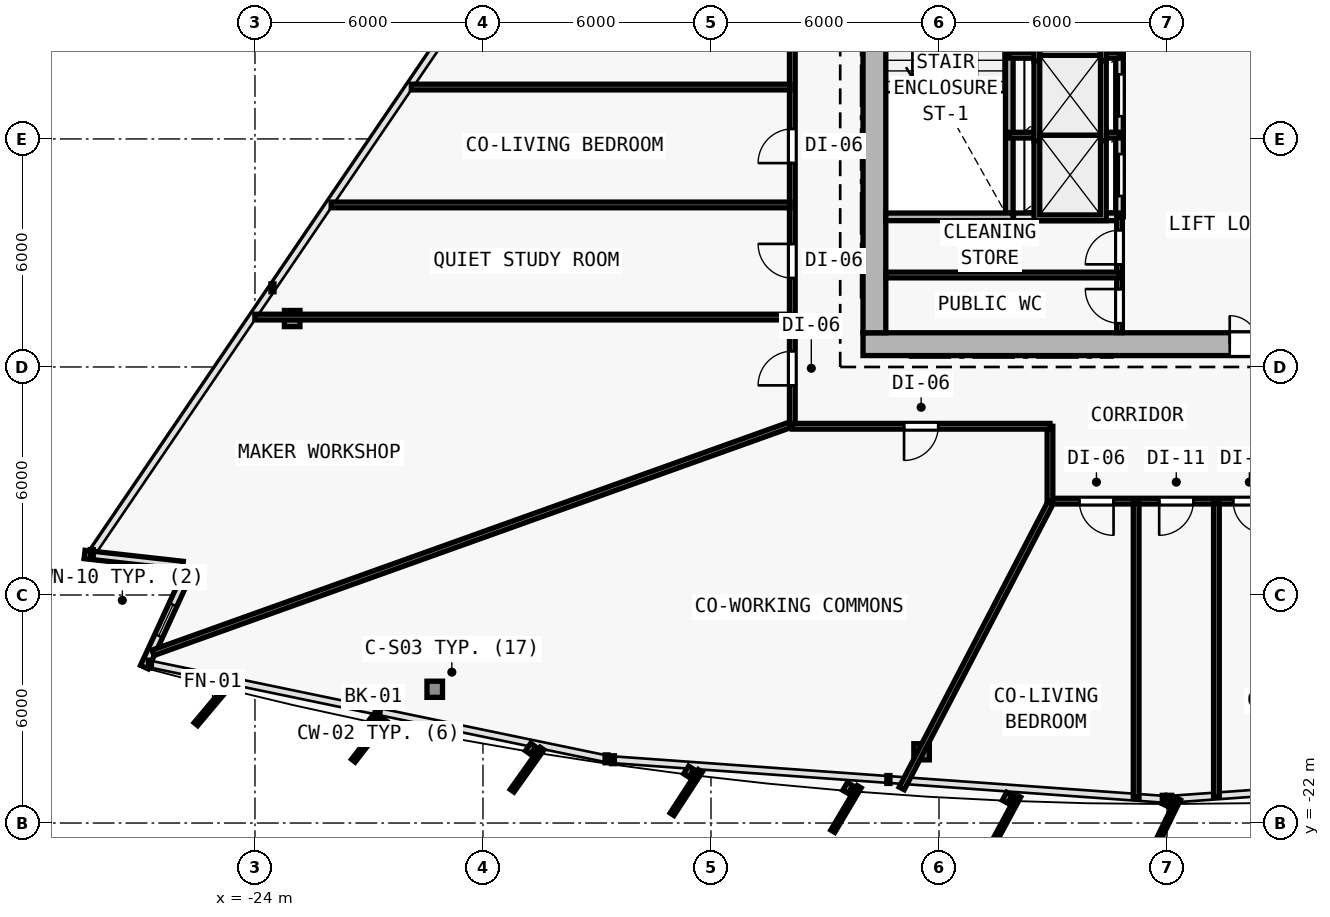
"""IFC4 building model, lengths in metres.
Left out: names, types, materials, properties, quantities, classifications, styles, units other than length and angle.
Written with IfcOpenShell. Run it as: python <this file> out.ifc"""

import sys

from ifc_helpers import new_model, si_unit, direction, frame, frame_2d, origin, origin_2d, place, context, subcontext, project, spatial, rectangle, i_section, extrude, element, fill, save


model = new_model("IFC4")
c1 = context("Model", 3, precision=1e-05, world=origin(), true_north=direction((0.0, 1.0)))
c2 = subcontext(c1, "Body", "Model", "MODEL_VIEW")
j1 = project(units=[si_unit("LENGTHUNIT", "METRE"), si_unit("PLANEANGLEUNIT", "RADIAN")], contexts=[c1])
p1 = place(None, origin())
s1 = spatial("IfcSite", under=j1, at=p1, CompositionType="ELEMENT")
p2 = place(p1, origin())
s2 = spatial("IfcBuilding", under=s1, at=p2, CompositionType="ELEMENT")
p3 = place(p2, frame((0.0, 0.0, 82.5)))
s3 = spatial("IfcBuildingStorey", under=s2, at=p3, CompositionType="ELEMENT", Elevation=82.5)
for number, where, z_axis, x_axis in (
    (1, (-7.7, -9.4, 0.0), (0.0, 0.0, 1.0), (1.0, 0.0, 0.0)),
    (2, (0.0, -9.4, 0.0), (0.0, 0.0, 1.0), (1.0, 0.0, 0.0)),
):
    element("IfcColumn", number, at=place(p3, frame(where, z_axis=z_axis, x_axis=x_axis)), inside=s3, PredefinedType="COLUMN", context=c2, shape_type="SweptSolid", body=[
        extrude(i_section(OverallWidth=0.409, OverallDepth=0.425, WebThickness=0.021, FlangeThickness=0.034, FilletRadius=0.015, at=origin_2d()), origin(), (0.0, 0.0, 1.0), 3.6),
    ])
p4 = place(p3, frame((-19.269, -18.48, 0.006), z_axis=(0.020596292833, 0.033511459955, 0.999226087917), x_axis=(-0.851954850327, 0.523615252838, 0.0)))
e3 = element("IfcColumn", 3, at=p4, inside=s3, PredefinedType="COLUMN", context=c2, shape_type="SweptSolid", body=[
    extrude(i_section(OverallWidth=0.409, OverallDepth=0.425, WebThickness=0.021, FlangeThickness=0.034, FilletRadius=0.015, at=origin_2d()), origin(), (0.0, 0.0, 1.0), 3.592),
])
p5 = place(p3, frame((-6.458, -20.125, 0.006), z_axis=(0.006934288159, 0.035283289748, 0.999353293441), x_axis=(-0.981229659911, 0.192842823335, 0.0)))
e4 = element("IfcColumn", 4, at=p5, inside=s3, PredefinedType="COLUMN", context=c2, shape_type="SweptSolid", body=[
    extrude(i_section(OverallWidth=0.409, OverallDepth=0.425, WebThickness=0.021, FlangeThickness=0.034, FilletRadius=0.015, at=origin_2d()), origin(), (0.0, 0.0, 1.0), 3.591),
])
p6 = place(p3, frame((-23.02, -8.726, 0.006), z_axis=(0.025224163578, 0.021620711639, 0.999447990843), x_axis=(-0.650791373456, 0.759256602365, 0.0)))
e5 = element("IfcColumn", 5, at=p6, inside=s3, PredefinedType="COLUMN", context=c2, shape_type="SweptSolid", body=[
    extrude(i_section(OverallWidth=0.409, OverallDepth=0.425, WebThickness=0.021, FlangeThickness=0.034, FilletRadius=0.015, at=origin_2d()), origin(), (0.0, 0.0, 1.0), 3.591),
])
p7 = place(p3, frame((-25.898, -15.223, 0.0), z_axis=(0.0, 0.0, 1.0), x_axis=(-0.993827522589, 0.110936267041, 0.0)))
e6 = element("IfcWall", 6, at=p7, inside=s3, PredefinedType="SOLIDWALL", context=c2, shape_type="SweptSolid", body=[
    extrude(rectangle(XDim=2.601, YDim=0.22, at=frame_2d((1.301, 0.0))), origin(), (0.0, 0.0, 1.0), 3.35),
])
p8 = place(p3, frame((-26.911, -17.897, 0.0), z_axis=(0.0, 0.0, 1.0), x_axis=(0.417504190978, 0.908674997189, 0.0)))
e7 = element("IfcWall", 7, at=p8, inside=s3, PredefinedType="SOLIDWALL", context=c2, shape_type="SweptSolid", body=[
    extrude(rectangle(XDim=2.711, YDim=0.22, at=frame_2d((1.355, 0.0))), origin(), (0.0, 0.0, 1.0), 3.35),
])
p9 = place(p8, frame((0.906, 0.0, 0.62)))
e8 = element("IfcOpeningElement", 8, at=p9, cuts=e7, PredefinedType="OPENING", context=c2, shape_type="SweptSolid", body=[
    extrude(rectangle(XDim=0.9, YDim=1.6, at=frame_2d((0.45, 0.8))), frame((0.0, 0.12, 0.0), z_axis=(0.0, -1.0, 0.0), x_axis=(1.0, 0.0, 0.0)), (0.0, 0.0, 1.0), 0.24),
])
p10 = place(p3, frame((-8.0, -9.4, 0.0), z_axis=(0.0, 0.0, 1.0), x_axis=(1.0, 0.0, 0.0)))
e9 = element("IfcWall", 9, at=p10, inside=s3, PredefinedType="SHEAR", context=c2, shape_type="SweptSolid", body=[
    extrude(rectangle(XDim=16.0, YDim=0.6, at=frame_2d((8.0, 0.0))), origin(), (0.0, 0.0, 1.0), 3.35),
])
p11 = place(p10, frame((9.65, 0.0, 0.0)))
e10 = element("IfcOpeningElement", 10, at=p11, cuts=e9, PredefinedType="OPENING", context=c2, shape_type="SweptSolid", body=[
    extrude(rectangle(XDim=1.5, YDim=2.2, at=frame_2d((0.75, 1.1))), frame((0.0, 0.31, 0.0), z_axis=(0.0, -1.0, 0.0), x_axis=(1.0, 0.0, 0.0)), (0.0, 0.0, 1.0), 0.62),
])
p12 = place(p3, frame((-7.7, -9.1, 0.0), z_axis=(0.0, 0.0, 1.0), x_axis=(0.0, 1.0, 0.0)))
e11 = element("IfcWall", 11, at=p12, inside=s3, PredefinedType="SHEAR", context=c2, shape_type="SweptSolid", body=[
    extrude(rectangle(XDim=19.0, YDim=0.6, at=frame_2d((9.5, 0.0))), origin(), (0.0, 0.0, 1.0), 3.35),
])
p13 = place(p12, frame((12.65, 0.0, 0.0)))
e12 = element("IfcOpeningElement", 12, at=p13, cuts=e11, PredefinedType="OPENING", context=c2, shape_type="SweptSolid", body=[
    extrude(rectangle(XDim=1.1, YDim=2.15, at=frame_2d((0.55, 1.075))), frame((0.0, 0.31, 0.0), z_axis=(0.0, -1.0, 0.0), x_axis=(1.0, 0.0, 0.0)), (0.0, 0.0, 1.0), 0.62),
])
p14 = place(p3, frame((-4.15, -5.95, 0.0), z_axis=(0.0, 0.0, 1.0), x_axis=(0.0, 1.0, 0.0)))
e13 = element("IfcWall", 13, at=p14, inside=s3, PredefinedType="SOLIDWALL", context=c2, shape_type="SweptSolid", body=[
    extrude(rectangle(XDim=7.2, YDim=0.2, at=frame_2d((3.6, 0.0))), origin(), (0.0, 0.0, 1.0), 3.35),
])
p15 = place(p3, frame((-1.25, -6.05, 0.0), z_axis=(0.0, 0.0, 1.0), x_axis=(0.0, 1.0, 0.0)))
e14 = element("IfcWall", 14, at=p15, inside=s3, PredefinedType="SOLIDWALL", context=c2, shape_type="SweptSolid", body=[
    extrude(rectangle(XDim=8.7, YDim=0.2, at=frame_2d((4.35, 0.0))), origin(), (0.0, 0.0, 1.0), 3.35),
])
p16 = place(p15, frame((0.55, 0.0, 0.0)))
e15 = element("IfcOpeningElement", 15, at=p16, cuts=e14, PredefinedType="OPENING", context=c2, shape_type="SweptSolid", body=[
    extrude(rectangle(XDim=1.1, YDim=2.15, at=frame_2d((0.55, 1.075))), frame((0.0, 0.11, 0.0), z_axis=(0.0, -1.0, 0.0), x_axis=(1.0, 0.0, 0.0)), (0.0, 0.0, 1.0), 0.22),
])
p17 = place(p15, frame((2.65, 0.0, 0.0)))
e16 = element("IfcOpeningElement", 16, at=p17, cuts=e14, PredefinedType="OPENING", context=c2, shape_type="SweptSolid", body=[
    extrude(rectangle(XDim=1.1, YDim=2.15, at=frame_2d((0.55, 1.075))), frame((0.0, 0.11, 0.0), z_axis=(0.0, -1.0, 0.0), x_axis=(1.0, 0.0, 0.0)), (0.0, 0.0, 1.0), 0.22),
])
p18 = place(p15, frame((4.75, 0.0, 0.0)))
e17 = element("IfcOpeningElement", 17, at=p18, cuts=e14, PredefinedType="OPENING", context=c2, shape_type="SweptSolid", body=[
    extrude(rectangle(XDim=1.1, YDim=2.15, at=frame_2d((0.55, 1.075))), frame((0.0, 0.11, 0.0), z_axis=(0.0, -1.0, 0.0), x_axis=(1.0, 0.0, 0.0)), (0.0, 0.0, 1.0), 0.22),
])
p19 = place(p15, frame((6.85, 0.0, 0.0)))
e18 = element("IfcOpeningElement", 18, at=p19, cuts=e14, PredefinedType="OPENING", context=c2, shape_type="SweptSolid", body=[
    extrude(rectangle(XDim=1.1, YDim=2.15, at=frame_2d((0.55, 1.075))), frame((0.0, 0.11, 0.0), z_axis=(0.0, -1.0, 0.0), x_axis=(1.0, 0.0, 0.0)), (0.0, 0.0, 1.0), 0.22),
])
for number, where, z_axis, x_axis in (
    (19, (-4.15, -3.9, 0.0), (0.0, 0.0, 1.0), (1.0, 0.0, 0.0)),
    (20, (-4.15, -1.8, 0.0), (0.0, 0.0, 1.0), (1.0, 0.0, 0.0)),
):
    element("IfcWall", number, at=place(p3, frame(where, z_axis=z_axis, x_axis=x_axis)), inside=s3, PredefinedType="PARTITIONING", context=c2, shape_type="SweptSolid", body=[
        extrude(rectangle(XDim=2.9, YDim=0.15, at=frame_2d((1.45, 0.0))), origin(), (0.0, 0.0, 1.0), 3.35),
    ])
p20 = place(p3, frame((-7.4, -6.05, 0.0), z_axis=(0.0, 0.0, 1.0), x_axis=(1.0, 0.0, 0.0)))
e21 = element("IfcWall", 21, at=p20, inside=s3, PredefinedType="SOLIDWALL", context=c2, shape_type="SweptSolid", body=[
    extrude(rectangle(XDim=3.35, YDim=0.2, at=frame_2d((1.675, 0.0))), origin(), (0.0, 0.0, 1.0), 3.35),
])
p21 = place(p3, frame((-4.04, -6.05, 0.0), z_axis=(0.0, 0.0, 1.0), x_axis=(1.0, 0.0, 0.0)))
e22 = element("IfcWall", 22, at=p21, inside=s3, PredefinedType="SOLIDWALL", context=c2, shape_type="SweptSolid", body=[
    extrude(rectangle(XDim=2.79, YDim=0.2, at=frame_2d((1.395, 0.0))), origin(), (0.0, 0.0, 1.0), 3.35),
])
p22 = place(p3, frame((-1.25, -9.095, 0.0), z_axis=(0.0, 0.0, 1.0), x_axis=(0.0, 1.0, 0.0)))
e23 = element("IfcWall", 23, at=p22, inside=s3, PredefinedType="PARTITIONING", context=c2, shape_type="SweptSolid", body=[
    extrude(rectangle(XDim=3.045, YDim=0.15, at=frame_2d((1.522, 0.0))), origin(), (0.0, 0.0, 1.0), 3.35),
])
p23 = place(p22, frame((1.795, 0.0, 0.0)))
e24 = element("IfcOpeningElement", 24, at=p23, cuts=e23, PredefinedType="OPENING", context=c2, shape_type="SweptSolid", body=[
    extrude(rectangle(XDim=0.9, YDim=2.1, at=frame_2d((0.45, 1.05))), frame((0.0, 0.085, 0.0), z_axis=(0.0, -1.0, 0.0), x_axis=(1.0, 0.0, 0.0)), (0.0, 0.0, 1.0), 0.17),
])
p24 = place(p22, frame((0.245, 0.0, 0.0)))
e25 = element("IfcOpeningElement", 25, at=p24, cuts=e23, PredefinedType="OPENING", context=c2, shape_type="SweptSolid", body=[
    extrude(rectangle(XDim=0.9, YDim=2.1, at=frame_2d((0.45, 1.05))), frame((0.0, 0.085, 0.0), z_axis=(0.0, -1.0, 0.0), x_axis=(1.0, 0.0, 0.0)), (0.0, 0.0, 1.0), 0.17),
])
p25 = place(p3, frame((-7.395, -7.58, 0.0), z_axis=(0.0, 0.0, 1.0), x_axis=(1.0, 0.0, 0.0)))
e26 = element("IfcWall", 26, at=p25, inside=s3, PredefinedType="PARTITIONING", context=c2, shape_type="SweptSolid", body=[
    extrude(rectangle(XDim=6.145, YDim=0.15, at=frame_2d((3.073, 0.0))), origin(), (0.0, 0.0, 1.0), 3.35),
])
p26 = place(p3, frame((-9.86, -11.56, 0.0), z_axis=(0.0, 0.0, 1.0), x_axis=(0.0, 1.0, 0.0)))
e27 = element("IfcWall", 27, at=p26, inside=s3, PredefinedType="PARTITIONING", context=c2, shape_type="SweptSolid", body=[
    extrude(rectangle(XDim=19.986, YDim=0.15, at=frame_2d((9.993, 0.0))), origin(), (0.0, 0.0, 1.0), 2.609),
])
p27 = place(p26, frame((9.988, 0.0, 0.0)))
e28 = element("IfcOpeningElement", 28, at=p27, cuts=e27, PredefinedType="OPENING", context=c2, shape_type="SweptSolid", body=[
    extrude(rectangle(XDim=0.9, YDim=2.1, at=frame_2d((0.45, 1.05))), frame((0.0, 0.085, 0.0), z_axis=(0.0, -1.0, 0.0), x_axis=(1.0, 0.0, 0.0)), (0.0, 0.0, 1.0), 0.17),
])
p28 = place(p26, frame((6.925, 0.0, 0.0)))
e29 = element("IfcOpeningElement", 29, at=p28, cuts=e27, PredefinedType="OPENING", context=c2, shape_type="SweptSolid", body=[
    extrude(rectangle(XDim=0.9, YDim=2.1, at=frame_2d((0.45, 1.05))), frame((0.0, 0.085, 0.0), z_axis=(0.0, -1.0, 0.0), x_axis=(1.0, 0.0, 0.0)), (0.0, 0.0, 1.0), 0.17),
])
p29 = place(p26, frame((3.898, 0.0, 0.0)))
e30 = element("IfcOpeningElement", 30, at=p29, cuts=e27, PredefinedType="OPENING", context=c2, shape_type="SweptSolid", body=[
    extrude(rectangle(XDim=0.9, YDim=2.1, at=frame_2d((0.45, 1.05))), frame((0.0, 0.085, 0.0), z_axis=(0.0, -1.0, 0.0), x_axis=(1.0, 0.0, 0.0)), (0.0, 0.0, 1.0), 0.17),
])
p30 = place(p26, frame((1.076, 0.0, 0.0)))
e31 = element("IfcOpeningElement", 31, at=p30, cuts=e27, PredefinedType="OPENING", context=c2, shape_type="SweptSolid", body=[
    extrude(rectangle(XDim=0.9, YDim=2.1, at=frame_2d((0.45, 1.05))), frame((0.0, 0.085, 0.0), z_axis=(0.0, -1.0, 0.0), x_axis=(1.0, 0.0, 0.0)), (0.0, 0.0, 1.0), 0.17),
])
p31 = place(p26, frame((12.649, 0.0, 0.0)))
e32 = element("IfcOpeningElement", 32, at=p31, cuts=e27, PredefinedType="OPENING", context=c2, shape_type="SweptSolid", body=[
    extrude(rectangle(XDim=0.9, YDim=2.1, at=frame_2d((0.45, 1.05))), frame((0.0, 0.085, 0.0), z_axis=(0.0, -1.0, 0.0), x_axis=(1.0, 0.0, 0.0)), (0.0, 0.0, 1.0), 0.17),
])
p32 = place(p3, frame((3.08, -13.53, 0.0), z_axis=(0.0, 0.0, 1.0), x_axis=(-1.0, 0.0, 0.0)))
e33 = element("IfcWall", 33, at=p32, inside=s3, PredefinedType="PARTITIONING", context=c2, shape_type="SweptSolid", body=[
    extrude(rectangle(XDim=6.16, YDim=0.15, at=frame_2d((3.08, 0.0))), origin(), (0.0, 0.0, 1.0), 2.725),
])
p33 = place(p32, frame((4.487, 0.0, 0.0)))
e34 = element("IfcOpeningElement", 34, at=p33, cuts=e33, PredefinedType="OPENING", context=c2, shape_type="SweptSolid", body=[
    extrude(rectangle(XDim=0.9, YDim=2.1, at=frame_2d((0.45, 1.05))), frame((0.0, 0.085, 0.0), z_axis=(0.0, -1.0, 0.0), x_axis=(1.0, 0.0, 0.0)), (0.0, 0.0, 1.0), 0.17),
])
p34 = place(p32, frame((2.386, 0.0, 0.0)))
e35 = element("IfcOpeningElement", 35, at=p34, cuts=e33, PredefinedType="OPENING", context=c2, shape_type="SweptSolid", body=[
    extrude(rectangle(XDim=0.9, YDim=2.1, at=frame_2d((0.45, 1.05))), frame((0.0, 0.085, 0.0), z_axis=(0.0, -1.0, 0.0), x_axis=(1.0, 0.0, 0.0)), (0.0, 0.0, 1.0), 0.17),
])
p35 = place(p32, frame((0.489, 0.0, 0.0)))
e36 = element("IfcOpeningElement", 36, at=p35, cuts=e33, PredefinedType="OPENING", context=c2, shape_type="SweptSolid", body=[
    extrude(rectangle(XDim=0.85, YDim=2.1, at=frame_2d((0.425, 1.05))), frame((0.0, 0.085, 0.0), z_axis=(0.0, -1.0, 0.0), x_axis=(1.0, 0.0, 0.0)), (0.0, 0.0, 1.0), 0.17),
])
p36 = place(p3, frame((-3.08, -13.53, 0.0), z_axis=(0.0, 0.0, 1.0), x_axis=(0.0, 1.0, 0.0)))
e37 = element("IfcWall", 37, at=p36, inside=s3, PredefinedType="PARTITIONING", context=c2, shape_type="SweptSolid", body=[
    extrude(rectangle(XDim=1.97, YDim=0.15, at=frame_2d((0.985, 0.0))), origin(), (0.0, 0.0, 1.0), 2.965),
])
p37 = place(p3, frame((-3.08, -11.56, 0.0), z_axis=(0.0, 0.0, 1.0), x_axis=(-1.0, 0.0, 0.0)))
e38 = element("IfcWall", 38, at=p37, inside=s3, PredefinedType="PARTITIONING", context=c2, shape_type="SweptSolid", body=[
    extrude(rectangle(XDim=6.78, YDim=0.15, at=frame_2d((3.39, 0.0))), origin(), (0.0, 0.0, 1.0), 3.35),
])
p38 = place(p37, frame((2.94, 0.0, 0.0)))
e39 = element("IfcOpeningElement", 39, at=p38, cuts=e38, PredefinedType="OPENING", context=c2, shape_type="SweptSolid", body=[
    extrude(rectangle(XDim=0.9, YDim=2.1, at=frame_2d((0.45, 1.05))), frame((0.0, 0.085, 0.0), z_axis=(0.0, -1.0, 0.0), x_axis=(1.0, 0.0, 0.0)), (0.0, 0.0, 1.0), 0.17),
])
p39 = place(p3, frame((-3.066, -13.573, 0.0), z_axis=(0.0, 0.0, 1.0), x_axis=(-0.461995798776, -0.886882112749, 0.0)))
e40 = element("IfcWall", 40, at=p39, inside=s3, PredefinedType="PARTITIONING", context=c2, shape_type="SweptSolid", body=[
    extrude(rectangle(XDim=8.474, YDim=0.15, at=frame_2d((4.237, 0.0))), origin(), (0.0, 0.0, 1.0), 2.725),
])
p40 = place(p3, frame((-9.92, -8.687, 0.0), z_axis=(0.0, 0.0, 1.0), x_axis=(-1.0, 0.0, 0.0)))
e41 = element("IfcWall", 41, at=p40, inside=s3, PredefinedType="PARTITIONING", context=c2, shape_type="SweptSolid", body=[
    extrude(rectangle(XDim=14.083, YDim=0.15, at=frame_2d((7.041, 0.0))), origin(), (0.0, 0.0, 1.0), 2.609),
])
p41 = place(p3, frame((-9.92, -2.635, 0.0), z_axis=(0.0, 0.0, 1.0), x_axis=(-1.0, 0.0, 0.0)))
e42 = element("IfcWall", 42, at=p41, inside=s3, PredefinedType="PARTITIONING", context=c2, shape_type="SweptSolid", body=[
    extrude(rectangle(XDim=9.965, YDim=0.15, at=frame_2d((4.983, 0.0))), origin(), (0.0, 0.0, 1.0), 2.835),
])
p42 = place(p3, frame((-0.812, -13.59, 0.0), z_axis=(0.0, 0.0, 1.0), x_axis=(0.0, -1.0, 0.0)))
e43 = element("IfcWall", 43, at=p42, inside=s3, PredefinedType="PARTITIONING", context=c2, shape_type="SweptSolid", body=[
    extrude(rectangle(XDim=7.732, YDim=0.15, at=frame_2d((3.866, 0.0))), origin(), (0.0, 0.0, 1.0), 2.835),
])
p43 = place(p3, frame((-9.92, -5.736, 0.0), z_axis=(0.0, 0.0, 1.0), x_axis=(-1.0, 0.0, 0.0)))
e44 = element("IfcWall", 44, at=p43, inside=s3, PredefinedType="PARTITIONING", context=c2, shape_type="SweptSolid", body=[
    extrude(rectangle(XDim=12.075, YDim=0.15, at=frame_2d((6.038, 0.0))), origin(), (0.0, 0.0, 1.0), 2.835),
])
p44 = place(p3, frame((-9.914, -11.521, 0.0), z_axis=(0.0, 0.0, 1.0), x_axis=(-0.941545444301, -0.33688599899, 0.0)))
e45 = element("IfcWall", 45, at=p44, inside=s3, PredefinedType="PARTITIONING", context=c2, shape_type="SweptSolid", body=[
    extrude(rectangle(XDim=17.811, YDim=0.15, at=frame_2d((8.905, 0.0))), origin(), (0.0, 0.0, 1.0), 2.725),
])
p45 = place(p3, frame((1.3, -13.59, 0.0), z_axis=(0.0, 0.0, 1.0), x_axis=(0.0, -1.0, 0.0)))
e46 = element("IfcWall", 46, at=p45, inside=s3, PredefinedType="PARTITIONING", context=c2, shape_type="SweptSolid", body=[
    extrude(rectangle(XDim=7.727, YDim=0.15, at=frame_2d((3.864, 0.0))), origin(), (0.0, 0.0, 1.0), 2.835),
])
p46 = place(p9, origin())
e47 = element("IfcWindow", 47, at=p46, inside=s3, PartitioningType="SINGLE_PANEL", PredefinedType="WINDOW", context=c2, shape_type="SweptSolid", body=[
    extrude(rectangle(XDim=0.9, YDim=1.6, at=frame_2d((0.45, 0.8))), frame((0.0, 0.03, 0.0), z_axis=(0.0, -1.0, 0.0), x_axis=(1.0, 0.0, 0.0)), (0.0, 0.0, 1.0), 0.06),
])
fill(e8, e47)
p47 = place(p11, origin())
e48 = element("IfcDoor", 48, at=p47, inside=s3, OperationType="DOUBLE_DOOR_SINGLE_SWING", PredefinedType="DOOR", context=c2, shape_type="SweptSolid", body=[
    extrude(rectangle(XDim=1.5, YDim=2.2, at=frame_2d((0.75, 1.1))), frame((0.0, 0.025, 0.0), z_axis=(0.0, -1.0, 0.0), x_axis=(1.0, 0.0, 0.0)), (0.0, 0.0, 1.0), 0.05),
])
fill(e10, e48)
p48 = place(p16, origin())
e49 = element("IfcDoor", 49, at=p48, inside=s3, OperationType="DOUBLE_DOOR_SLIDING", PredefinedType="DOOR", context=c2, shape_type="SweptSolid", body=[
    extrude(rectangle(XDim=1.1, YDim=2.15, at=frame_2d((0.55, 1.075))), frame((0.0, 0.025, 0.0), z_axis=(0.0, -1.0, 0.0), x_axis=(1.0, 0.0, 0.0)), (0.0, 0.0, 1.0), 0.05),
])
fill(e15, e49)
p49 = place(p17, origin())
e50 = element("IfcDoor", 50, at=p49, inside=s3, OperationType="DOUBLE_DOOR_SLIDING", PredefinedType="DOOR", context=c2, shape_type="SweptSolid", body=[
    extrude(rectangle(XDim=1.1, YDim=2.15, at=frame_2d((0.55, 1.075))), frame((0.0, 0.025, 0.0), z_axis=(0.0, -1.0, 0.0), x_axis=(1.0, 0.0, 0.0)), (0.0, 0.0, 1.0), 0.05),
])
fill(e16, e50)
p50 = place(p23, origin())
e51 = element("IfcDoor", 51, at=p50, inside=s3, OperationType="SINGLE_SWING_LEFT", PredefinedType="DOOR", context=c2, shape_type="SweptSolid", body=[
    extrude(rectangle(XDim=0.9, YDim=2.1, at=frame_2d((0.45, 1.05))), frame((0.0, 0.025, 0.0), z_axis=(0.0, -1.0, 0.0), x_axis=(1.0, 0.0, 0.0)), (0.0, 0.0, 1.0), 0.05),
])
fill(e24, e51)
p51 = place(p24, origin())
e52 = element("IfcDoor", 52, at=p51, inside=s3, OperationType="SINGLE_SWING_RIGHT", PredefinedType="DOOR", context=c2, shape_type="SweptSolid", body=[
    extrude(rectangle(XDim=0.9, YDim=2.1, at=frame_2d((0.45, 1.05))), frame((0.0, 0.025, 0.0), z_axis=(0.0, -1.0, 0.0), x_axis=(1.0, 0.0, 0.0)), (0.0, 0.0, 1.0), 0.05),
])
fill(e25, e52)
p52 = place(p28, origin())
e53 = element("IfcDoor", 53, at=p52, inside=s3, OperationType="SINGLE_SWING_LEFT", PredefinedType="DOOR", context=c2, shape_type="SweptSolid", body=[
    extrude(rectangle(XDim=0.9, YDim=2.1, at=frame_2d((0.45, 1.05))), frame((0.0, 0.025, 0.0), z_axis=(0.0, -1.0, 0.0), x_axis=(1.0, 0.0, 0.0)), (0.0, 0.0, 1.0), 0.05),
])
fill(e29, e53)
p53 = place(p29, origin())
e54 = element("IfcDoor", 54, at=p53, inside=s3, OperationType="SINGLE_SWING_RIGHT", PredefinedType="DOOR", context=c2, shape_type="SweptSolid", body=[
    extrude(rectangle(XDim=0.9, YDim=2.1, at=frame_2d((0.45, 1.05))), frame((0.0, 0.025, 0.0), z_axis=(0.0, -1.0, 0.0), x_axis=(1.0, 0.0, 0.0)), (0.0, 0.0, 1.0), 0.05),
])
fill(e30, e54)
p54 = place(p30, origin())
e55 = element("IfcDoor", 55, at=p54, inside=s3, OperationType="SINGLE_SWING_LEFT", PredefinedType="DOOR", context=c2, shape_type="SweptSolid", body=[
    extrude(rectangle(XDim=0.9, YDim=2.1, at=frame_2d((0.45, 1.05))), frame((0.0, 0.025, 0.0), z_axis=(0.0, -1.0, 0.0), x_axis=(1.0, 0.0, 0.0)), (0.0, 0.0, 1.0), 0.05),
])
fill(e31, e55)
p55 = place(p38, origin())
e56 = element("IfcDoor", 56, at=p55, inside=s3, OperationType="SINGLE_SWING_RIGHT", PredefinedType="DOOR", context=c2, shape_type="SweptSolid", body=[
    extrude(rectangle(XDim=0.9, YDim=2.1, at=frame_2d((0.45, 1.05))), frame((0.0, 0.025, 0.0), z_axis=(0.0, -1.0, 0.0), x_axis=(1.0, 0.0, 0.0)), (0.0, 0.0, 1.0), 0.05),
])
fill(e39, e56)
p56 = place(p33, origin())
e57 = element("IfcDoor", 57, at=p56, inside=s3, OperationType="SINGLE_SWING_LEFT", PredefinedType="DOOR", context=c2, shape_type="SweptSolid", body=[
    extrude(rectangle(XDim=0.9, YDim=2.1, at=frame_2d((0.45, 1.05))), frame((0.0, 0.025, 0.0), z_axis=(0.0, -1.0, 0.0), x_axis=(1.0, 0.0, 0.0)), (0.0, 0.0, 1.0), 0.05),
])
fill(e34, e57)
p57 = place(p34, origin())
e58 = element("IfcDoor", 58, at=p57, inside=s3, OperationType="SINGLE_SWING_RIGHT", PredefinedType="DOOR", context=c2, shape_type="SweptSolid", body=[
    extrude(rectangle(XDim=0.9, YDim=2.1, at=frame_2d((0.45, 1.05))), frame((0.0, 0.025, 0.0), z_axis=(0.0, -1.0, 0.0), x_axis=(1.0, 0.0, 0.0)), (0.0, 0.0, 1.0), 0.05),
])
fill(e35, e58)
p58 = place(p35, origin())
e59 = element("IfcDoor", 59, at=p58, inside=s3, OperationType="SINGLE_SWING_LEFT", PredefinedType="DOOR", context=c2, shape_type="SweptSolid", body=[
    extrude(rectangle(XDim=0.85, YDim=2.1, at=frame_2d((0.425, 1.05))), frame((0.0, 0.025, 0.0), z_axis=(0.0, -1.0, 0.0), x_axis=(1.0, 0.0, 0.0)), (0.0, 0.0, 1.0), 0.05),
])
fill(e36, e59)
save(model, sys.argv[1])
